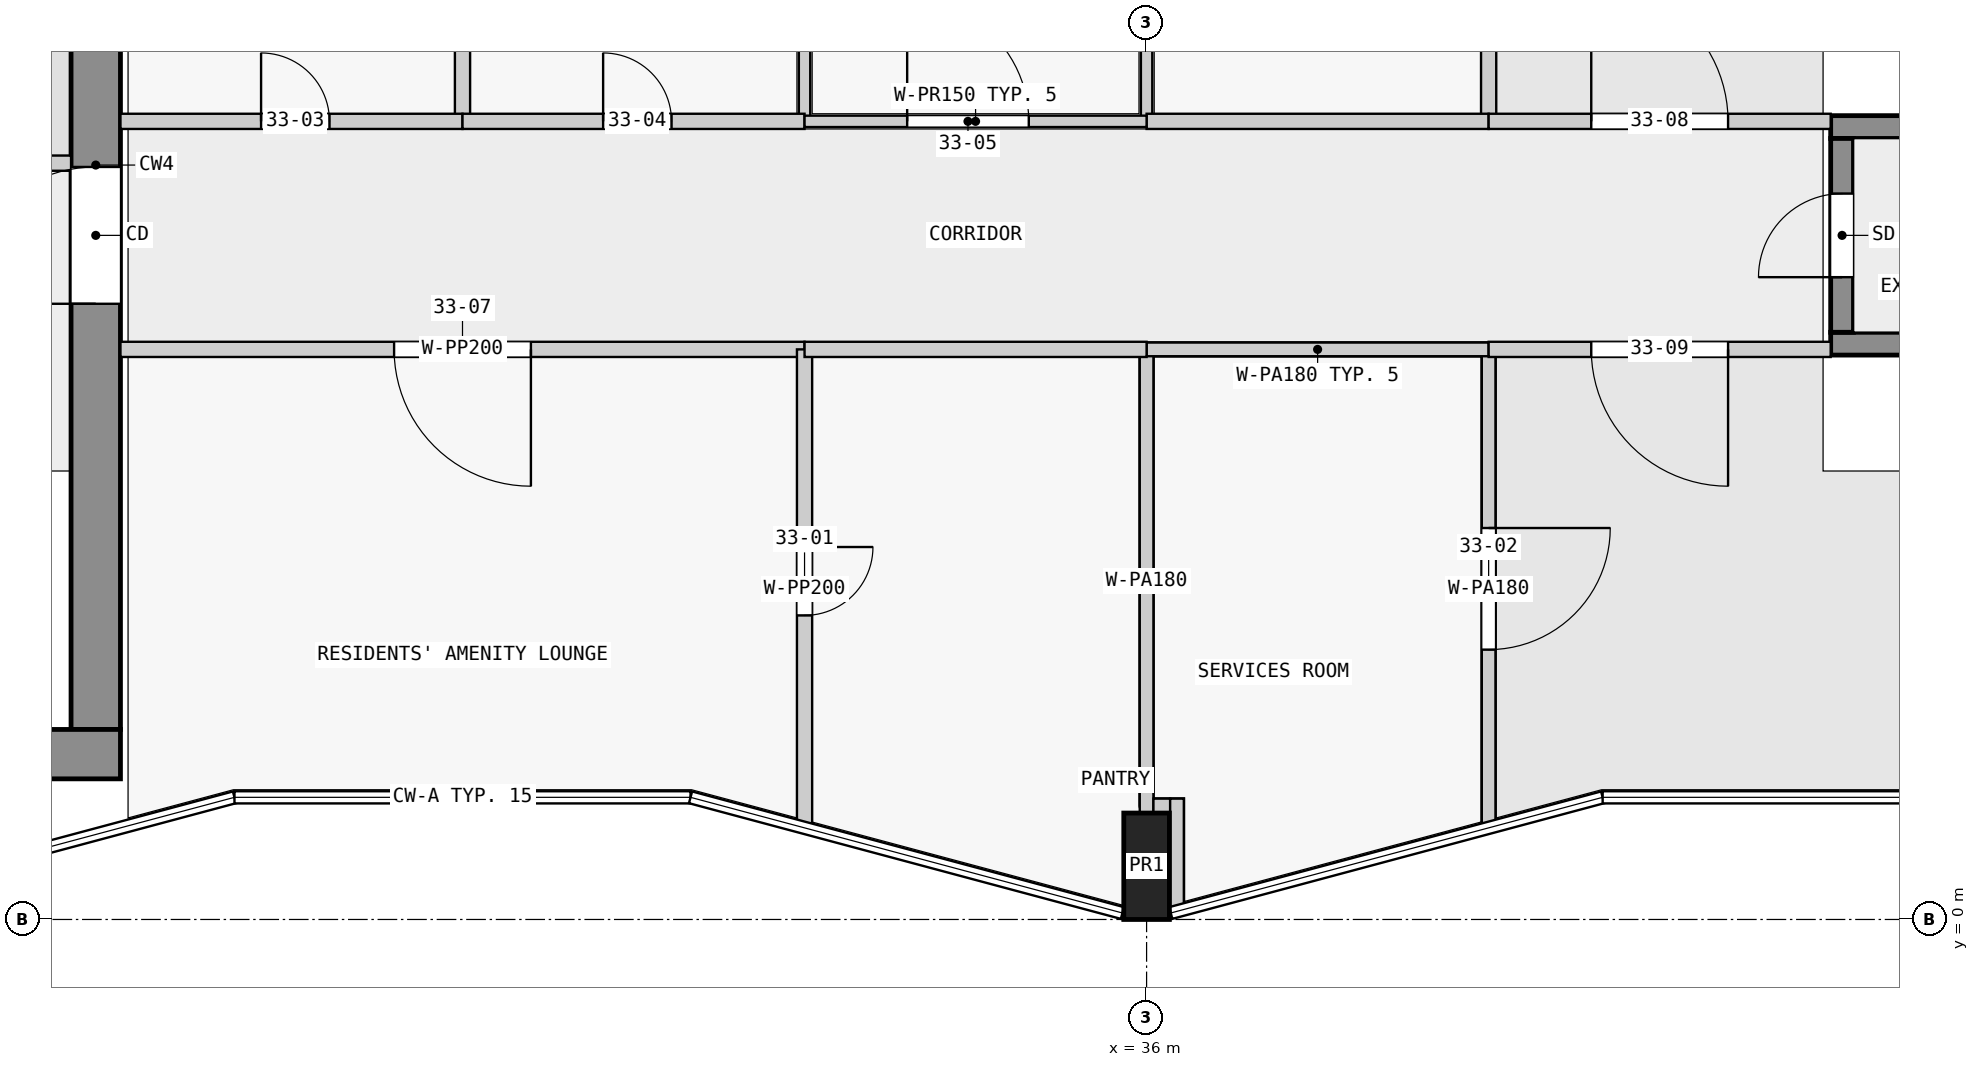
"""IFC4 building model, lengths in metres.
Left out: names, types, materials, properties, quantities, classifications, styles, units other than length and angle.
Written with IfcOpenShell. Run it as: python <this file> out.ifc"""

import sys

from ifc_helpers import new_model, si_unit, direction, frame, frame_2d, origin, origin_2d, place, context, subcontext, project, spatial, rectangle, extrude, element, fill, save


model = new_model("IFC4")
c1 = context("Model", 3, precision=1e-05, world=origin(), true_north=direction((0.0, 1.0)))
c2 = subcontext(c1, "Body", "Model", "MODEL_VIEW")
j1 = project(units=[si_unit("LENGTHUNIT", "METRE"), si_unit("PLANEANGLEUNIT", "RADIAN")], contexts=[c1])
p1 = place(None, origin())
s1 = spatial("IfcSite", under=j1, at=p1, CompositionType="ELEMENT")
p2 = place(p1, origin())
s2 = spatial("IfcBuilding", under=s1, at=p2, CompositionType="ELEMENT")
p3 = place(p2, frame((0.0, 0.0, 128.6)))
s3 = spatial("IfcBuildingStorey", under=s2, at=p3, CompositionType="ELEMENT", Elevation=128.6)
p4 = place(p3, frame((36.0, 0.7, 0.0), z_axis=(0.0, 0.0, 1.0), x_axis=(1.0, 0.0, 0.0)))
e1 = element("IfcColumn", 1, at=p4, inside=s3, PredefinedType="COLUMN", context=c2, shape_type="SweptSolid", body=[
    extrude(rectangle(XDim=0.6, YDim=1.4, at=origin_2d()), origin(), (0.0, 0.0, 1.0), 6.0),
])
p5 = place(p3, frame((1.65, 2.175, 0.0), z_axis=(0.0, 0.0, 1.0), x_axis=(1.0, 0.0, 0.0)))
e2 = element("IfcWall", 2, at=p5, inside=s3, PredefinedType="SHEAR", context=c2, shape_type="SweptSolid", body=[
    extrude(rectangle(XDim=20.85, YDim=0.65, at=frame_2d((10.425, 0.0))), origin(), (0.0, 0.0, 1.0), 5.7),
])
p6 = place(p3, frame((22.175, 2.5, 0.0), z_axis=(0.0, 0.0, 1.0), x_axis=(0.0, 1.0, 0.0)))
e3 = element("IfcWall", 3, at=p6, inside=s3, PredefinedType="SHEAR", context=c2, shape_type="SweptSolid", body=[
    extrude(rectangle(XDim=14.85, YDim=0.65, at=frame_2d((7.425, 0.0))), origin(), (0.0, 0.0, 1.0), 5.7),
])
p7 = place(p6, frame((5.6, 0.0, 0.0)))
e4 = element("IfcOpeningElement", 4, at=p7, cuts=e3, PredefinedType="OPENING", context=c2, shape_type="SweptSolid", body=[
    extrude(rectangle(XDim=1.8, YDim=2.1, at=frame_2d((0.9, 1.05))), frame((0.0, 0.335, 0.0), z_axis=(0.0, -1.0, 0.0), x_axis=(1.0, 0.0, 0.0)), (0.0, 0.0, 1.0), 0.67),
])
p8 = place(p3, frame((45.15, 7.725, 0.0), z_axis=(0.0, 0.0, 1.0), x_axis=(0.0, 1.0, 0.0)))
e5 = element("IfcWall", 5, at=p8, inside=s3, PredefinedType="SHEAR", context=c2, shape_type="SweptSolid", body=[
    extrude(rectangle(XDim=2.55, YDim=0.3, at=frame_2d((1.275, 0.0))), origin(), (0.0, 0.0, 1.0), 6.0),
])
p9 = place(p8, frame((0.725, 0.0, 0.0)))
e6 = element("IfcOpeningElement", 6, at=p9, cuts=e5, PredefinedType="OPENING", context=c2, shape_type="SweptSolid", body=[
    extrude(rectangle(XDim=1.1, YDim=2.1, at=frame_2d((0.55, 1.05))), frame((0.0, 0.16, 0.0), z_axis=(0.0, -1.0, 0.0), x_axis=(1.0, 0.0, 0.0)), (0.0, 0.0, 1.0), 0.32),
])
for number, where, z_axis, x_axis in (
    (7, (45.0, 7.575, 0.0), (0.0, 0.0, 1.0), (1.0, 0.0, 0.0)),
    (8, (45.0, 10.425, 0.0), (0.0, 0.0, 1.0), (1.0, 0.0, 0.0)),
):
    element("IfcWall", number, at=place(p3, frame(where, z_axis=z_axis, x_axis=x_axis)), inside=s3, PredefinedType="SHEAR", context=c2, shape_type="SweptSolid", body=[
        extrude(rectangle(XDim=7.2, YDim=0.3, at=frame_2d((3.6, 0.0))), origin(), (0.0, 0.0, 1.0), 6.0),
    ])
p10 = place(p3, frame((7.1, 9.95, 0.0), z_axis=(0.0, 0.0, 1.0), x_axis=(1.0, 0.0, 0.0)))
e9 = element("IfcWall", 9, at=p10, inside=s3, PredefinedType="PARTITIONING", context=c2, shape_type="SweptSolid", body=[
    extrude(rectangle(XDim=14.75, YDim=0.2, at=frame_2d((7.375, 0.0))), origin(), (0.0, 0.0, 1.0), 5.7),
])
p11 = place(p10, frame((6.35, 0.0, 0.0)))
e10 = element("IfcOpeningElement", 10, at=p11, cuts=e9, PredefinedType="OPENING", context=c2, shape_type="SweptSolid", body=[
    extrude(rectangle(XDim=1.1, YDim=2.1, at=frame_2d((0.55, 1.05))), frame((0.0, 0.11, 0.0), z_axis=(0.0, -1.0, 0.0), x_axis=(1.0, 0.0, 0.0)), (0.0, 0.0, 1.0), 0.22),
])
p12 = place(p3, frame((31.5, 7.5, 0.0), z_axis=(0.0, 0.0, 1.0), x_axis=(-1.0, 0.0, 0.0)))
e11 = element("IfcWall", 11, at=p12, inside=s3, PredefinedType="PARTITIONING", context=c2, shape_type="SweptSolid", body=[
    extrude(rectangle(XDim=9.0, YDim=0.2, at=frame_2d((4.5, 0.0))), origin(), (0.0, 0.0, 1.0), 5.7),
])
p13 = place(p12, frame((3.6, 0.0, 0.0)))
e12 = element("IfcOpeningElement", 12, at=p13, cuts=e11, PredefinedType="OPENING", context=c2, shape_type="SweptSolid", body=[
    extrude(rectangle(XDim=1.8, YDim=2.1, at=frame_2d((0.9, 1.05))), frame((0.0, 0.11, 0.0), z_axis=(0.0, -1.0, 0.0), x_axis=(1.0, 0.0, 0.0)), (0.0, 0.0, 1.0), 0.22),
])
p14 = place(p3, frame((36.0, 7.5, 0.0), z_axis=(0.0, 0.0, 1.0), x_axis=(0.0, -1.0, 0.0)))
e13 = element("IfcWall", 13, at=p14, inside=s3, PredefinedType="PARTITIONING", context=c2, shape_type="SweptSolid", body=[
    extrude(rectangle(XDim=6.09, YDim=0.18, at=frame_2d((3.045, 0.0))), origin(), (0.0, 0.0, 1.0), 5.7),
])
p15 = place(p3, frame((36.09, 1.5, 0.0), z_axis=(0.0, 0.0, 1.0), x_axis=(1.0, 0.0, 0.0)))
e14 = element("IfcWall", 14, at=p15, inside=s3, PredefinedType="PARTITIONING", context=c2, shape_type="SweptSolid", body=[
    extrude(rectangle(XDim=0.22, YDim=0.18, at=frame_2d((0.11, 0.0))), origin(), (0.0, 0.0, 1.0), 5.7),
])
p16 = place(p3, frame((36.4, 1.59, 0.0), z_axis=(0.0, 0.0, 1.0), x_axis=(0.0, -1.0, 0.0)))
e15 = element("IfcWall", 15, at=p16, inside=s3, PredefinedType="PARTITIONING", context=c2, shape_type="SweptSolid", body=[
    extrude(rectangle(XDim=1.483, YDim=0.18, at=frame_2d((0.742, 0.0))), origin(), (0.0, 0.0, 1.0), 5.7),
])
p17 = place(p3, frame((36.0, 16.5, 0.0), z_axis=(0.0, 0.0, 1.0), x_axis=(0.0, -1.0, 0.0)))
e16 = element("IfcWall", 16, at=p17, inside=s3, PredefinedType="PARTITIONING", context=c2, shape_type="SweptSolid", body=[
    extrude(rectangle(XDim=6.0, YDim=0.15, at=frame_2d((3.0, 0.0))), origin(), (0.0, 0.0, 1.0), 5.7),
])
p18 = place(p3, frame((40.5, 16.795, 0.0), z_axis=(0.0, 0.0, 1.0), x_axis=(0.0, -1.0, 0.0)))
e17 = element("IfcWall", 17, at=p18, inside=s3, PredefinedType="PARTITIONING", context=c2, shape_type="SweptSolid", body=[
    extrude(rectangle(XDim=6.295, YDim=0.2, at=frame_2d((3.147, 0.0))), origin(), (0.0, 0.0, 1.0), 5.7),
])
p19 = place(p18, frame((2.6, 0.0, 0.0)))
e18 = element("IfcOpeningElement", 18, at=p19, cuts=e17, PredefinedType="OPENING", context=c2, shape_type="SweptSolid", body=[
    extrude(rectangle(XDim=0.9, YDim=2.1, at=frame_2d((0.45, 1.05))), frame((0.0, 0.11, 0.0), z_axis=(0.0, -1.0, 0.0), x_axis=(1.0, 0.0, 0.0)), (0.0, 0.0, 1.0), 0.22),
])
p20 = place(p3, frame((40.5, 7.5, 0.0), z_axis=(0.0, 0.0, 1.0), x_axis=(0.0, -1.0, 0.0)))
e19 = element("IfcWall", 19, at=p20, inside=s3, PredefinedType="PARTITIONING", context=c2, shape_type="SweptSolid", body=[
    extrude(rectangle(XDim=6.295, YDim=0.18, at=frame_2d((3.147, 0.0))), origin(), (0.0, 0.0, 1.0), 5.7),
])
p21 = place(p20, frame((2.35, 0.0, 0.0)))
e20 = element("IfcOpeningElement", 20, at=p21, cuts=e19, PredefinedType="OPENING", context=c2, shape_type="SweptSolid", body=[
    extrude(rectangle(XDim=1.6, YDim=2.4, at=frame_2d((0.8, 1.2))), frame((0.0, 0.1, 0.0), z_axis=(0.0, -1.0, 0.0), x_axis=(1.0, 0.0, 0.0)), (0.0, 0.0, 1.0), 0.2),
])
p22 = place(p3, frame((31.5, 16.795, 0.0), z_axis=(0.0, 0.0, 1.0), x_axis=(0.0, -1.0, 0.0)))
e21 = element("IfcWall", 21, at=p22, inside=s3, PredefinedType="PARTITIONING", context=c2, shape_type="SweptSolid", body=[
    extrude(rectangle(XDim=6.295, YDim=0.15, at=frame_2d((3.147, 0.0))), origin(), (0.0, 0.0, 1.0), 5.7),
])
p23 = place(p3, frame((31.5, 7.5, 0.0), z_axis=(0.0, 0.0, 1.0), x_axis=(0.0, -1.0, 0.0)))
e22 = element("IfcWall", 22, at=p23, inside=s3, PredefinedType="PARTITIONING", context=c2, shape_type="SweptSolid", body=[
    extrude(rectangle(XDim=6.295, YDim=0.2, at=frame_2d((3.147, 0.0))), origin(), (0.0, 0.0, 1.0), 5.7),
])
p24 = place(p23, frame((2.6, 0.0, 0.0)))
e23 = element("IfcOpeningElement", 23, at=p24, cuts=e22, PredefinedType="OPENING", context=c2, shape_type="SweptSolid", body=[
    extrude(rectangle(XDim=0.9, YDim=2.1, at=frame_2d((0.45, 1.05))), frame((0.0, 0.11, 0.0), z_axis=(0.0, -1.0, 0.0), x_axis=(1.0, 0.0, 0.0)), (0.0, 0.0, 1.0), 0.22),
])
p25 = place(p3, frame((27.0, 16.393, 0.0), z_axis=(0.0, 0.0, 1.0), x_axis=(0.0, -1.0, 0.0)))
e24 = element("IfcWall", 24, at=p25, inside=s3, PredefinedType="PARTITIONING", context=c2, shape_type="SweptSolid", body=[
    extrude(rectangle(XDim=5.893, YDim=0.2, at=frame_2d((2.947, 0.0))), origin(), (0.0, 0.0, 1.0), 5.7),
])
p26 = place(p3, frame((36.0, 10.5, 0.0), z_axis=(0.0, 0.0, 1.0), x_axis=(1.0, 0.0, 0.0)))
e25 = element("IfcWall", 25, at=p26, inside=s3, PredefinedType="PARTITIONING", context=c2, shape_type="SweptSolid", body=[
    extrude(rectangle(XDim=4.5, YDim=0.2, at=frame_2d((2.25, 0.0))), origin(), (0.0, 0.0, 1.0), 5.7),
])
p27 = place(p3, frame((40.5, 7.5, 0.0), z_axis=(0.0, 0.0, 1.0), x_axis=(-1.0, 0.0, 0.0)))
e26 = element("IfcWall", 26, at=p27, inside=s3, PredefinedType="PARTITIONING", context=c2, shape_type="SweptSolid", body=[
    extrude(rectangle(XDim=4.5, YDim=0.18, at=frame_2d((2.25, 0.0))), origin(), (0.0, 0.0, 1.0), 5.7),
])
p28 = place(p3, frame((40.5, 10.5, 0.0), z_axis=(0.0, 0.0, 1.0), x_axis=(1.0, 0.0, 0.0)))
e27 = element("IfcWall", 27, at=p28, inside=s3, PredefinedType="PARTITIONING", context=c2, shape_type="SweptSolid", body=[
    extrude(rectangle(XDim=4.5, YDim=0.2, at=frame_2d((2.25, 0.0))), origin(), (0.0, 0.0, 1.0), 5.7),
])
p29 = place(p28, frame((1.35, 0.0, 0.0)))
e28 = element("IfcOpeningElement", 28, at=p29, cuts=e27, PredefinedType="OPENING", context=c2, shape_type="SweptSolid", body=[
    extrude(rectangle(XDim=1.8, YDim=2.1, at=frame_2d((0.9, 1.05))), frame((0.0, 0.11, 0.0), z_axis=(0.0, -1.0, 0.0), x_axis=(1.0, 0.0, 0.0)), (0.0, 0.0, 1.0), 0.22),
])
p30 = place(p3, frame((22.5, 10.5, 0.0), z_axis=(0.0, 0.0, 1.0), x_axis=(1.0, 0.0, 0.0)))
e29 = element("IfcWall", 29, at=p30, inside=s3, PredefinedType="PARTITIONING", context=c2, shape_type="SweptSolid", body=[
    extrude(rectangle(XDim=4.5, YDim=0.2, at=frame_2d((2.25, 0.0))), origin(), (0.0, 0.0, 1.0), 5.7),
])
p31 = place(p30, frame((1.85, 0.0, 0.0)))
e30 = element("IfcOpeningElement", 30, at=p31, cuts=e29, PredefinedType="OPENING", context=c2, shape_type="SweptSolid", body=[
    extrude(rectangle(XDim=0.9, YDim=2.1, at=frame_2d((0.45, 1.05))), frame((0.0, 0.11, 0.0), z_axis=(0.0, -1.0, 0.0), x_axis=(1.0, 0.0, 0.0)), (0.0, 0.0, 1.0), 0.22),
])
p32 = place(p3, frame((27.0, 10.5, 0.0), z_axis=(0.0, 0.0, 1.0), x_axis=(1.0, 0.0, 0.0)))
e31 = element("IfcWall", 31, at=p32, inside=s3, PredefinedType="PARTITIONING", context=c2, shape_type="SweptSolid", body=[
    extrude(rectangle(XDim=4.5, YDim=0.2, at=frame_2d((2.25, 0.0))), origin(), (0.0, 0.0, 1.0), 5.7),
])
p33 = place(p32, frame((1.85, 0.0, 0.0)))
e32 = element("IfcOpeningElement", 32, at=p33, cuts=e31, PredefinedType="OPENING", context=c2, shape_type="SweptSolid", body=[
    extrude(rectangle(XDim=0.9, YDim=2.1, at=frame_2d((0.45, 1.05))), frame((0.0, 0.11, 0.0), z_axis=(0.0, -1.0, 0.0), x_axis=(1.0, 0.0, 0.0)), (0.0, 0.0, 1.0), 0.22),
])
p34 = place(p3, frame((31.5, 10.5, 0.0), z_axis=(0.0, 0.0, 1.0), x_axis=(1.0, 0.0, 0.0)))
e33 = element("IfcWall", 33, at=p34, inside=s3, PredefinedType="PARTITIONING", context=c2, shape_type="SweptSolid", body=[
    extrude(rectangle(XDim=4.5, YDim=0.15, at=frame_2d((2.25, 0.0))), origin(), (0.0, 0.0, 1.0), 5.7),
])
p35 = place(p34, frame((1.35, 0.0, 0.0)))
e34 = element("IfcOpeningElement", 34, at=p35, cuts=e33, PredefinedType="OPENING", context=c2, shape_type="SweptSolid", body=[
    extrude(rectangle(XDim=1.6, YDim=2.4, at=frame_2d((0.8, 1.2))), frame((0.0, 0.085, 0.0), z_axis=(0.0, -1.0, 0.0), x_axis=(1.0, 0.0, 0.0)), (0.0, 0.0, 1.0), 0.17),
])
p36 = place(p3, frame((36.0, 7.5, 0.0), z_axis=(0.0, 0.0, 1.0), x_axis=(-1.0, 0.0, 0.0)))
e35 = element("IfcWall", 35, at=p36, inside=s3, PredefinedType="PARTITIONING", context=c2, shape_type="SweptSolid", body=[
    extrude(rectangle(XDim=4.5, YDim=0.2, at=frame_2d((2.25, 0.0))), origin(), (0.0, 0.0, 1.0), 5.7),
])
p37 = place(p3, frame((45.0, 7.5, 0.0), z_axis=(0.0, 0.0, 1.0), x_axis=(-1.0, 0.0, 0.0)))
e36 = element("IfcWall", 36, at=p37, inside=s3, PredefinedType="PARTITIONING", context=c2, shape_type="SweptSolid", body=[
    extrude(rectangle(XDim=4.5, YDim=0.2, at=frame_2d((2.25, 0.0))), origin(), (0.0, 0.0, 1.0), 5.7),
])
p38 = place(p37, frame((1.35, 0.0, 0.0)))
e37 = element("IfcOpeningElement", 37, at=p38, cuts=e36, PredefinedType="OPENING", context=c2, shape_type="SweptSolid", body=[
    extrude(rectangle(XDim=1.8, YDim=2.1, at=frame_2d((0.9, 1.05))), frame((0.0, 0.11, 0.0), z_axis=(0.0, -1.0, 0.0), x_axis=(1.0, 0.0, 0.0)), (0.0, 0.0, 1.0), 0.22),
])
p39 = place(p7, origin())
e38 = element("IfcDoor", 38, at=p39, inside=s3, OperationType="DOUBLE_DOOR_SINGLE_SWING", PredefinedType="DOOR", context=c2, shape_type="SweptSolid", body=[
    extrude(rectangle(XDim=1.8, YDim=2.1, at=frame_2d((0.9, 1.05))), frame((0.0, 0.025, 0.0), z_axis=(0.0, -1.0, 0.0), x_axis=(1.0, 0.0, 0.0)), (0.0, 0.0, 1.0), 0.05),
])
fill(e4, e38)
p40 = place(p9, origin())
e39 = element("IfcDoor", 39, at=p40, inside=s3, OperationType="SINGLE_SWING_LEFT", PredefinedType="DOOR", context=c2, shape_type="SweptSolid", body=[
    extrude(rectangle(XDim=1.1, YDim=2.1, at=frame_2d((0.55, 1.05))), frame((0.0, 0.025, 0.0), z_axis=(0.0, -1.0, 0.0), x_axis=(1.0, 0.0, 0.0)), (0.0, 0.0, 1.0), 0.05),
])
fill(e6, e39)
p41 = place(p24, origin())
e40 = element("IfcDoor", 40, at=p41, inside=s3, OperationType="SINGLE_SWING_LEFT", PredefinedType="DOOR", context=c2, shape_type="SweptSolid", body=[
    extrude(rectangle(XDim=0.9, YDim=2.1, at=frame_2d((0.45, 1.05))), frame((0.0, 0.025, 0.0), z_axis=(0.0, -1.0, 0.0), x_axis=(1.0, 0.0, 0.0)), (0.0, 0.0, 1.0), 0.05),
])
fill(e23, e40)
p42 = place(p21, origin())
e41 = element("IfcDoor", 41, at=p42, inside=s3, OperationType="SINGLE_SWING_LEFT", PredefinedType="DOOR", context=c2, shape_type="SweptSolid", body=[
    extrude(rectangle(XDim=1.6, YDim=2.4, at=frame_2d((0.8, 1.2))), frame((0.0, 0.025, 0.0), z_axis=(0.0, -1.0, 0.0), x_axis=(1.0, 0.0, 0.0)), (0.0, 0.0, 1.0), 0.05),
])
fill(e20, e41)
p43 = place(p31, origin())
e42 = element("IfcDoor", 42, at=p43, inside=s3, OperationType="SINGLE_SWING_LEFT", PredefinedType="DOOR", context=c2, shape_type="SweptSolid", body=[
    extrude(rectangle(XDim=0.9, YDim=2.1, at=frame_2d((0.45, 1.05))), frame((0.0, 0.025, 0.0), z_axis=(0.0, -1.0, 0.0), x_axis=(1.0, 0.0, 0.0)), (0.0, 0.0, 1.0), 0.05),
])
fill(e30, e42)
p44 = place(p33, origin())
e43 = element("IfcDoor", 43, at=p44, inside=s3, OperationType="SINGLE_SWING_LEFT", PredefinedType="DOOR", context=c2, shape_type="SweptSolid", body=[
    extrude(rectangle(XDim=0.9, YDim=2.1, at=frame_2d((0.45, 1.05))), frame((0.0, 0.025, 0.0), z_axis=(0.0, -1.0, 0.0), x_axis=(1.0, 0.0, 0.0)), (0.0, 0.0, 1.0), 0.05),
])
fill(e32, e43)
p45 = place(p35, origin())
e44 = element("IfcDoor", 44, at=p45, inside=s3, OperationType="SINGLE_SWING_LEFT", PredefinedType="DOOR", context=c2, shape_type="SweptSolid", body=[
    extrude(rectangle(XDim=1.6, YDim=2.4, at=frame_2d((0.8, 1.2))), frame((0.0, 0.025, 0.0), z_axis=(0.0, -1.0, 0.0), x_axis=(1.0, 0.0, 0.0)), (0.0, 0.0, 1.0), 0.05),
])
fill(e34, e44)
p46 = place(p13, origin())
e45 = element("IfcDoor", 45, at=p46, inside=s3, OperationType="DOUBLE_DOOR_SINGLE_SWING", PredefinedType="DOOR", context=c2, shape_type="SweptSolid", body=[
    extrude(rectangle(XDim=1.8, YDim=2.1, at=frame_2d((0.9, 1.05))), frame((0.0, 0.025, 0.0), z_axis=(0.0, -1.0, 0.0), x_axis=(1.0, 0.0, 0.0)), (0.0, 0.0, 1.0), 0.05),
])
fill(e12, e45)
p47 = place(p29, origin())
e46 = element("IfcDoor", 46, at=p47, inside=s3, OperationType="DOUBLE_DOOR_SINGLE_SWING", PredefinedType="DOOR", context=c2, shape_type="SweptSolid", body=[
    extrude(rectangle(XDim=1.8, YDim=2.1, at=frame_2d((0.9, 1.05))), frame((0.0, 0.025, 0.0), z_axis=(0.0, -1.0, 0.0), x_axis=(1.0, 0.0, 0.0)), (0.0, 0.0, 1.0), 0.05),
])
fill(e28, e46)
p48 = place(p38, origin())
e47 = element("IfcDoor", 47, at=p48, inside=s3, OperationType="DOUBLE_DOOR_SINGLE_SWING", PredefinedType="DOOR", context=c2, shape_type="SweptSolid", body=[
    extrude(rectangle(XDim=1.8, YDim=2.1, at=frame_2d((0.9, 1.05))), frame((0.0, 0.025, 0.0), z_axis=(0.0, -1.0, 0.0), x_axis=(1.0, 0.0, 0.0)), (0.0, 0.0, 1.0), 0.05),
])
fill(e37, e47)
save(model, sys.argv[1])
